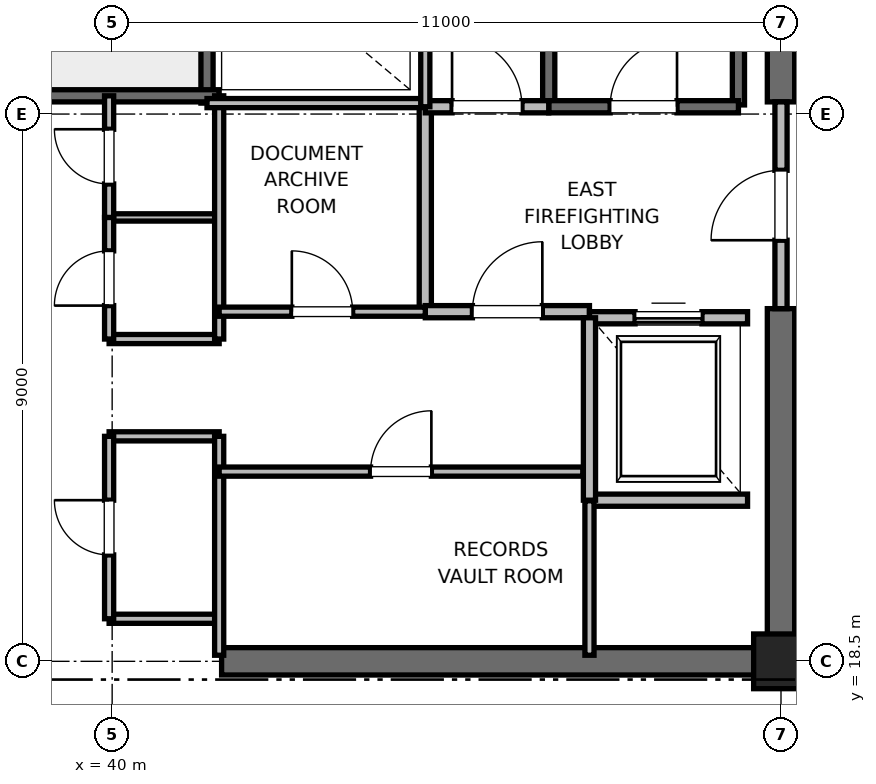
"""IFC4 building model, lengths in metres.
Left out: names, types, materials, properties, quantities, classifications, styles, units other than length and angle.
Written with IfcOpenShell. Run it as: python <this file> out.ifc"""

import sys

from ifc_helpers import new_model, si_unit, direction, frame, frame_2d, origin, origin_2d, place, context, subcontext, project, spatial, rectangle, extrude, element, fill, save


model = new_model("IFC4")
c1 = context("Model", 3, precision=1e-05, world=origin(), true_north=direction((0.0, 1.0)))
c2 = subcontext(c1, "Body", "Model", "MODEL_VIEW")
j1 = project(units=[si_unit("LENGTHUNIT", "METRE"), si_unit("PLANEANGLEUNIT", "RADIAN")], contexts=[c1])
p1 = place(None, origin())
s1 = spatial("IfcSite", under=j1, at=p1, CompositionType="ELEMENT")
p2 = place(p1, origin())
s2 = spatial("IfcBuilding", under=s1, at=p2, CompositionType="ELEMENT")
p3 = place(p2, frame((0.0, 0.0, 287.2)))
s3 = spatial("IfcBuildingStorey", under=s2, at=p3, CompositionType="ELEMENT", Elevation=287.2)
p4 = place(p3, frame((51.0, 18.5, 0.0), z_axis=(0.0, 0.0, 1.0), x_axis=(1.0, 0.0, 0.0)))
e1 = element("IfcColumn", 1, at=p4, inside=s3, PredefinedType="PILASTER", context=c2, shape_type="SweptSolid", body=[
    extrude(rectangle(XDim=0.9, YDim=0.9, at=origin_2d()), origin(), (0.0, 0.0, 1.0), 4.0),
])
p5 = place(p3, frame((41.8, 18.5, 0.0), z_axis=(0.0, 0.0, 1.0), x_axis=(1.0, 0.0, 0.0)))
e2 = element("IfcWall", 2, at=p5, inside=s3, PredefinedType="SHEAR", context=c2, shape_type="SweptSolid", body=[
    extrude(rectangle(XDim=9.2, YDim=0.45, at=frame_2d((4.6, 0.0))), origin(), (0.0, 0.0, 1.0), 3.785),
])
p6 = place(p3, frame((51.0, 18.5, 0.0), z_axis=(0.0, 0.0, 1.0), x_axis=(0.0, 1.0, 0.0)))
e3 = element("IfcWall", 3, at=p6, inside=s3, PredefinedType="SHEAR", context=c2, shape_type="SweptSolid", body=[
    extrude(rectangle(XDim=5.8, YDim=0.45, at=frame_2d((2.9, 0.0))), origin(), (0.0, 0.0, 1.0), 3.785),
])
p7 = place(p3, frame((51.0, 27.7, 0.0), z_axis=(0.0, 0.0, 1.0), x_axis=(0.0, 1.0, 0.0)))
e4 = element("IfcWall", 4, at=p7, inside=s3, PredefinedType="SHEAR", context=c2, shape_type="SweptSolid", body=[
    extrude(rectangle(XDim=8.8, YDim=0.45, at=frame_2d((4.4, 0.0))), origin(), (0.0, 0.0, 1.0), 3.785),
])
p8 = place(p3, frame((50.3, 27.65, 0.0), z_axis=(0.0, 0.0, 1.0), x_axis=(0.0, 1.0, 0.0)))
e5 = element("IfcWall", 5, at=p8, inside=s3, PredefinedType="SOLIDWALL", context=c2, shape_type="SweptSolid", body=[
    extrude(rectangle(XDim=8.15, YDim=0.2, at=frame_2d((4.075, 0.0))), origin(), (0.0, 0.0, 1.0), 3.785),
])
p9 = place(p3, frame((47.18, 27.62, 0.0), z_axis=(0.0, 0.0, 1.0), x_axis=(0.0, 1.0, 0.0)))
e6 = element("IfcWall", 6, at=p9, inside=s3, PredefinedType="SOLIDWALL", context=c2, shape_type="SweptSolid", body=[
    extrude(rectangle(XDim=8.18, YDim=0.2, at=frame_2d((4.09, 0.0))), origin(), (0.0, 0.0, 1.0), 3.785),
])
p10 = place(p3, frame((47.18, 27.62, 0.0), z_axis=(0.0, 0.0, 1.0), x_axis=(1.0, 0.0, 0.0)))
e7 = element("IfcWall", 7, at=p10, inside=s3, PredefinedType="SOLIDWALL", context=c2, shape_type="SweptSolid", body=[
    extrude(rectangle(XDim=3.12, YDim=0.2, at=frame_2d((1.56, 0.0))), origin(), (0.0, 0.0, 1.0), 3.785),
])
p11 = place(p10, frame((1.01, 0.0, 0.0)))
e8 = element("IfcOpeningElement", 8, at=p11, cuts=e7, PredefinedType="OPENING", context=c2, shape_type="SweptSolid", body=[
    extrude(rectangle(XDim=1.1, YDim=2.15, at=frame_2d((0.55, 1.075))), frame((0.0, 0.1, 0.0), z_axis=(0.0, -1.0, 0.0), x_axis=(1.0, 0.0, 0.0)), (0.0, 0.0, 1.0), 0.2),
])
p12 = place(p3, frame((41.56, 27.68, 0.0), z_axis=(0.0, 0.0, 1.0), x_axis=(0.0, 1.0, 0.0)))
e9 = element("IfcWall", 9, at=p12, inside=s3, PredefinedType="SOLIDWALL", context=c2, shape_type="SweptSolid", body=[
    extrude(rectangle(XDim=8.57, YDim=0.2, at=frame_2d((4.285, 0.0))), origin(), (0.0, 0.0, 1.0), 3.785),
])
p13 = place(p3, frame((38.44, 27.8, 0.0), z_axis=(0.0, 0.0, 1.0), x_axis=(1.0, 0.0, 0.0)))
e10 = element("IfcWall", 10, at=p13, inside=s3, PredefinedType="SOLIDWALL", context=c2, shape_type="SweptSolid", body=[
    extrude(rectangle(XDim=3.32, YDim=0.2, at=frame_2d((1.66, 0.0))), origin(), (0.0, 0.0, 1.0), 3.785),
])
p14 = place(p3, frame((45.15, 24.25, 0.0), z_axis=(0.0, 0.0, 1.0), x_axis=(0.0, 1.0, 0.0)))
e11 = element("IfcWall", 11, at=p14, inside=s3, PredefinedType="PARTITIONING", context=c2, shape_type="SweptSolid", body=[
    extrude(rectangle(XDim=3.37, YDim=0.2, at=frame_2d((1.685, 0.0))), origin(), (0.0, 0.0, 1.0), 3.785),
])
p15 = place(p3, frame((45.15, 24.25, 0.0), z_axis=(0.0, 0.0, 1.0), x_axis=(1.0, 0.0, 0.0)))
e12 = element("IfcWall", 12, at=p15, inside=s3, PredefinedType="PARTITIONING", context=c2, shape_type="SweptSolid", body=[
    extrude(rectangle(XDim=2.7, YDim=0.2, at=frame_2d((1.35, 0.0))), origin(), (0.0, 0.0, 1.0), 3.785),
])
p16 = place(p15, frame((0.775, 0.0, 0.0)))
e13 = element("IfcOpeningElement", 13, at=p16, cuts=e12, PredefinedType="OPENING", context=c2, shape_type="SweptSolid", body=[
    extrude(rectangle(XDim=1.15, YDim=2.2, at=frame_2d((0.575, 1.1))), frame((0.0, 0.1, 0.0), z_axis=(0.0, -1.0, 0.0), x_axis=(1.0, 0.0, 0.0)), (0.0, 0.0, 1.0), 0.2),
])
p17 = place(p3, frame((45.15, 27.62, 0.0), z_axis=(0.0, 0.0, 1.0), x_axis=(1.0, 0.0, 0.0)))
e14 = element("IfcWall", 14, at=p17, inside=s3, PredefinedType="PARTITIONING", context=c2, shape_type="SweptSolid", body=[
    extrude(rectangle(XDim=2.03, YDim=0.2, at=frame_2d((1.015, 0.0))), origin(), (0.0, 0.0, 1.0), 3.785),
])
p18 = place(p17, frame((0.44, 0.0, 0.0)))
e15 = element("IfcOpeningElement", 15, at=p18, cuts=e14, PredefinedType="OPENING", context=c2, shape_type="SweptSolid", body=[
    extrude(rectangle(XDim=1.15, YDim=2.2, at=frame_2d((0.575, 1.1))), frame((0.0, 0.1, 0.0), z_axis=(0.0, -1.0, 0.0), x_axis=(1.0, 0.0, 0.0)), (0.0, 0.0, 1.0), 0.2),
])
p19 = place(p3, frame((51.0, 24.3, 0.0), z_axis=(0.0, 0.0, 1.0), x_axis=(0.0, 1.0, 0.0)))
e16 = element("IfcWall", 16, at=p19, inside=s3, PredefinedType="PARTITIONING", context=c2, shape_type="SweptSolid", body=[
    extrude(rectangle(XDim=3.4, YDim=0.2, at=frame_2d((1.7, 0.0))), origin(), (0.0, 0.0, 1.0), 2.865),
])
p20 = place(p19, frame((1.125, 0.0, 0.0)))
e17 = element("IfcOpeningElement", 17, at=p20, cuts=e16, PredefinedType="OPENING", context=c2, shape_type="SweptSolid", body=[
    extrude(rectangle(XDim=1.15, YDim=2.2, at=frame_2d((0.575, 1.1))), frame((0.0, 0.1, 0.0), z_axis=(0.0, -1.0, 0.0), x_axis=(1.0, 0.0, 0.0)), (0.0, 0.0, 1.0), 0.2),
])
p21 = place(p3, frame((47.85, 21.15, 0.0), z_axis=(0.0, 0.0, 1.0), x_axis=(1.0, 0.0, 0.0)))
e18 = element("IfcWall", 18, at=p21, inside=s3, PredefinedType="SOLIDWALL", context=c2, shape_type="SweptSolid", body=[
    extrude(rectangle(XDim=2.6, YDim=0.2, at=frame_2d((1.3, 0.0))), origin(), (0.0, 0.0, 1.0), 3.785),
])
p22 = place(p3, frame((50.45, 24.15, 0.0), z_axis=(0.0, 0.0, 1.0), x_axis=(-1.0, 0.0, 0.0)))
e19 = element("IfcWall", 19, at=p22, inside=s3, PredefinedType="SOLIDWALL", context=c2, shape_type="SweptSolid", body=[
    extrude(rectangle(XDim=2.6, YDim=0.2, at=frame_2d((1.3, 0.0))), origin(), (0.0, 0.0, 1.0), 2.865),
])
p23 = place(p22, frame((0.75, 0.0, 0.0)))
e20 = element("IfcOpeningElement", 20, at=p23, cuts=e19, PredefinedType="OPENING", context=c2, shape_type="SweptSolid", body=[
    extrude(rectangle(XDim=1.1, YDim=2.2, at=frame_2d((0.55, 1.1))), frame((0.0, 0.1, 0.0), z_axis=(0.0, -1.0, 0.0), x_axis=(1.0, 0.0, 0.0)), (0.0, 0.0, 1.0), 0.2),
])
p24 = place(p3, frame((47.85, 24.15, 0.0), z_axis=(0.0, 0.0, 1.0), x_axis=(0.0, -1.0, 0.0)))
e21 = element("IfcWall", 21, at=p24, inside=s3, PredefinedType="SOLIDWALL", context=c2, shape_type="SweptSolid", body=[
    extrude(rectangle(XDim=3.0, YDim=0.2, at=frame_2d((1.5, 0.0))), origin(), (0.0, 0.0, 1.0), 3.785),
])
for number, where, z_axis, x_axis in (
    (22, (39.95, 19.2, 0.0), (0.0, 0.0, 1.0), (1.0, 0.0, 0.0)),
    (23, (39.95, 22.2, 0.0), (0.0, 0.0, 1.0), (1.0, 0.0, 0.0)),
    (24, (39.95, 23.8, 0.0), (0.0, 0.0, 1.0), (1.0, 0.0, 0.0)),
):
    element("IfcWall", number, at=place(p3, frame(where, z_axis=z_axis, x_axis=x_axis)), inside=s3, PredefinedType="PARTITIONING", context=c2, shape_type="SweptSolid", body=[
        extrude(rectangle(XDim=1.81, YDim=0.15, at=frame_2d((0.905, 0.0))), origin(), (0.0, 0.0, 1.0), 2.85),
    ])
p25 = place(p3, frame((39.95, 25.8, 0.0), z_axis=(0.0, 0.0, 1.0), x_axis=(1.0, 0.0, 0.0)))
e25 = element("IfcWall", 25, at=p25, inside=s3, PredefinedType="PARTITIONING", context=c2, shape_type="SweptSolid", body=[
    extrude(rectangle(XDim=1.81, YDim=0.12, at=frame_2d((0.905, 0.0))), origin(), (0.0, 0.0, 1.0), 2.85),
])
p26 = place(p3, frame((41.76, 18.6, 0.0), z_axis=(0.0, 0.0, 1.0), x_axis=(0.0, 1.0, 0.0)))
e26 = element("IfcWall", 26, at=p26, inside=s3, PredefinedType="PARTITIONING", context=c2, shape_type="SweptSolid", body=[
    extrude(rectangle(XDim=3.6, YDim=0.15, at=frame_2d((1.8, 0.0))), origin(), (0.0, 0.0, 1.0), 2.85),
])
p27 = place(p3, frame((41.76, 23.8, 0.0), z_axis=(0.0, 0.0, 1.0), x_axis=(0.0, 1.0, 0.0)))
e27 = element("IfcWall", 27, at=p27, inside=s3, PredefinedType="PARTITIONING", context=c2, shape_type="SweptSolid", body=[
    extrude(rectangle(XDim=4.0, YDim=0.15, at=frame_2d((2.0, 0.0))), origin(), (0.0, 0.0, 1.0), 2.85),
])
p28 = place(p3, frame((39.95, 19.2, 0.0), z_axis=(0.0, 0.0, 1.0), x_axis=(0.0, 1.0, 0.0)))
e28 = element("IfcWall", 28, at=p28, inside=s3, PredefinedType="PARTITIONING", context=c2, shape_type="SweptSolid", body=[
    extrude(rectangle(XDim=3.0, YDim=0.15, at=frame_2d((1.5, 0.0))), origin(), (0.0, 0.0, 1.0), 2.85),
])
p29 = place(p28, frame((1.05, 0.0, 0.0)))
e29 = element("IfcOpeningElement", 29, at=p29, cuts=e28, PredefinedType="OPENING", context=c2, shape_type="SweptSolid", body=[
    extrude(rectangle(XDim=0.9, YDim=2.1, at=frame_2d((0.45, 1.05))), frame((0.0, 0.075, 0.0), z_axis=(0.0, -1.0, 0.0), x_axis=(1.0, 0.0, 0.0)), (0.0, 0.0, 1.0), 0.15),
])
p30 = place(p3, frame((39.95, 23.8, 0.0), z_axis=(0.0, 0.0, 1.0), x_axis=(0.0, 1.0, 0.0)))
e30 = element("IfcWall", 30, at=p30, inside=s3, PredefinedType="PARTITIONING", context=c2, shape_type="SweptSolid", body=[
    extrude(rectangle(XDim=2.0, YDim=0.15, at=frame_2d((1.0, 0.0))), origin(), (0.0, 0.0, 1.0), 2.85),
])
p31 = place(p30, frame((0.55, 0.0, 0.0)))
e31 = element("IfcOpeningElement", 31, at=p31, cuts=e30, PredefinedType="OPENING", context=c2, shape_type="SweptSolid", body=[
    extrude(rectangle(XDim=0.9, YDim=2.1, at=frame_2d((0.45, 1.05))), frame((0.0, 0.075, 0.0), z_axis=(0.0, -1.0, 0.0), x_axis=(1.0, 0.0, 0.0)), (0.0, 0.0, 1.0), 0.15),
])
p32 = place(p3, frame((39.95, 25.8, 0.0), z_axis=(0.0, 0.0, 1.0), x_axis=(0.0, 1.0, 0.0)))
e32 = element("IfcWall", 32, at=p32, inside=s3, PredefinedType="PARTITIONING", context=c2, shape_type="SweptSolid", body=[
    extrude(rectangle(XDim=2.0, YDim=0.15, at=frame_2d((1.0, 0.0))), origin(), (0.0, 0.0, 1.0), 2.85),
])
p33 = place(p32, frame((0.55, 0.0, 0.0)))
e33 = element("IfcOpeningElement", 33, at=p33, cuts=e32, PredefinedType="OPENING", context=c2, shape_type="SweptSolid", body=[
    extrude(rectangle(XDim=0.9, YDim=2.1, at=frame_2d((0.45, 1.05))), frame((0.0, 0.075, 0.0), z_axis=(0.0, -1.0, 0.0), x_axis=(1.0, 0.0, 0.0)), (0.0, 0.0, 1.0), 0.15),
])
p34 = place(p3, frame((41.56, 27.68, 0.0), z_axis=(0.0, 0.0, 1.0), x_axis=(1.0, 0.0, 0.0)))
e34 = element("IfcWall", 34, at=p34, inside=s3, PredefinedType="PARTITIONING", context=c2, shape_type="SweptSolid", body=[
    extrude(rectangle(XDim=3.59, YDim=0.15, at=frame_2d((1.795, 0.0))), origin(), (0.0, 0.0, 1.0), 2.85),
])
p35 = place(p3, frame((47.85, 18.6, 0.0), z_axis=(0.0, 0.0, 1.0), x_axis=(0.0, 1.0, 0.0)))
e35 = element("IfcWall", 35, at=p35, inside=s3, PredefinedType="PARTITIONING", context=c2, shape_type="SweptSolid", body=[
    extrude(rectangle(XDim=2.54, YDim=0.15, at=frame_2d((1.27, 0.0))), origin(), (0.0, 0.0, 1.0), 2.85),
])
p36 = place(p3, frame((41.76, 21.62, 0.0), z_axis=(0.0, 0.0, 1.0), x_axis=(1.0, 0.0, 0.0)))
e36 = element("IfcWall", 36, at=p36, inside=s3, PredefinedType="PARTITIONING", context=c2, shape_type="SweptSolid", body=[
    extrude(rectangle(XDim=5.98, YDim=0.15, at=frame_2d((2.99, 0.0))), origin(), (0.0, 0.0, 1.0), 2.85),
])
p37 = place(p36, frame((2.49, 0.0, 0.0)))
e37 = element("IfcOpeningElement", 37, at=p37, cuts=e36, PredefinedType="OPENING", context=c2, shape_type="SweptSolid", body=[
    extrude(rectangle(XDim=1.0, YDim=2.15, at=frame_2d((0.5, 1.075))), frame((0.0, 0.075, 0.0), z_axis=(0.0, -1.0, 0.0), x_axis=(1.0, 0.0, 0.0)), (0.0, 0.0, 1.0), 0.15),
])
p38 = place(p3, frame((41.76, 24.25, 0.0), z_axis=(0.0, 0.0, 1.0), x_axis=(1.0, 0.0, 0.0)))
e38 = element("IfcWall", 38, at=p38, inside=s3, PredefinedType="PARTITIONING", context=c2, shape_type="SweptSolid", body=[
    extrude(rectangle(XDim=3.39, YDim=0.15, at=frame_2d((1.695, 0.0))), origin(), (0.0, 0.0, 1.0), 2.85),
])
p39 = place(p38, frame((1.195, 0.0, 0.0)))
e39 = element("IfcOpeningElement", 39, at=p39, cuts=e38, PredefinedType="OPENING", context=c2, shape_type="SweptSolid", body=[
    extrude(rectangle(XDim=1.0, YDim=2.15, at=frame_2d((0.5, 1.075))), frame((0.0, 0.075, 0.0), z_axis=(0.0, -1.0, 0.0), x_axis=(1.0, 0.0, 0.0)), (0.0, 0.0, 1.0), 0.15),
])
p40 = place(p3, frame((45.15, 27.62, 0.0), z_axis=(0.0, 0.0, 1.0), x_axis=(0.0, 1.0, 0.0)))
e40 = element("IfcWall", 40, at=p40, inside=s3, PredefinedType="PARTITIONING", context=c2, shape_type="SweptSolid", body=[
    extrude(rectangle(XDim=3.1, YDim=0.15, at=frame_2d((1.55, 0.0))), origin(), (0.0, 0.0, 1.0), 2.85),
])
p41 = place(p11, origin())
e41 = element("IfcDoor", 41, at=p41, inside=s3, OperationType="SINGLE_SWING_RIGHT", PredefinedType="DOOR", context=c2, shape_type="SweptSolid", body=[
    extrude(rectangle(XDim=1.1, YDim=2.15, at=frame_2d((0.55, 1.075))), frame((0.0, 0.025, 0.0), z_axis=(0.0, -1.0, 0.0), x_axis=(1.0, 0.0, 0.0)), (0.0, 0.0, 1.0), 0.05),
])
fill(e8, e41)
p42 = place(p16, origin())
e42 = element("IfcDoor", 42, at=p42, inside=s3, OperationType="SINGLE_SWING_RIGHT", PredefinedType="DOOR", context=c2, shape_type="SweptSolid", body=[
    extrude(rectangle(XDim=1.15, YDim=2.2, at=frame_2d((0.575, 1.1))), frame((0.0, 0.025, 0.0), z_axis=(0.0, -1.0, 0.0), x_axis=(1.0, 0.0, 0.0)), (0.0, 0.0, 1.0), 0.05),
])
fill(e13, e42)
p43 = place(p18, origin())
e43 = element("IfcDoor", 43, at=p43, inside=s3, OperationType="SINGLE_SWING_LEFT", PredefinedType="DOOR", context=c2, shape_type="SweptSolid", body=[
    extrude(rectangle(XDim=1.15, YDim=2.2, at=frame_2d((0.575, 1.1))), frame((0.0, 0.025, 0.0), z_axis=(0.0, -1.0, 0.0), x_axis=(1.0, 0.0, 0.0)), (0.0, 0.0, 1.0), 0.05),
])
fill(e15, e43)
p44 = place(p20, origin())
e44 = element("IfcDoor", 44, at=p44, inside=s3, OperationType="SINGLE_SWING_LEFT", PredefinedType="DOOR", context=c2, shape_type="SweptSolid", body=[
    extrude(rectangle(XDim=1.15, YDim=2.2, at=frame_2d((0.575, 1.1))), frame((0.0, 0.025, 0.0), z_axis=(0.0, -1.0, 0.0), x_axis=(1.0, 0.0, 0.0)), (0.0, 0.0, 1.0), 0.05),
])
fill(e17, e44)
p45 = place(p23, origin())
e45 = element("IfcDoor", 45, at=p45, inside=s3, OperationType="SLIDING_TO_RIGHT", PredefinedType="DOOR", context=c2, shape_type="SweptSolid", body=[
    extrude(rectangle(XDim=1.1, YDim=2.2, at=frame_2d((0.55, 1.1))), frame((0.0, 0.025, 0.0), z_axis=(0.0, -1.0, 0.0), x_axis=(1.0, 0.0, 0.0)), (0.0, 0.0, 1.0), 0.05),
])
fill(e20, e45)
p46 = place(p29, origin())
e46 = element("IfcDoor", 46, at=p46, inside=s3, OperationType="SINGLE_SWING_RIGHT", PredefinedType="DOOR", context=c2, shape_type="SweptSolid", body=[
    extrude(rectangle(XDim=0.9, YDim=2.1, at=frame_2d((0.45, 1.05))), frame((0.0, 0.025, 0.0), z_axis=(0.0, -1.0, 0.0), x_axis=(1.0, 0.0, 0.0)), (0.0, 0.0, 1.0), 0.05),
])
fill(e29, e46)
p47 = place(p31, origin())
e47 = element("IfcDoor", 47, at=p47, inside=s3, OperationType="SINGLE_SWING_LEFT", PredefinedType="DOOR", context=c2, shape_type="SweptSolid", body=[
    extrude(rectangle(XDim=0.9, YDim=2.1, at=frame_2d((0.45, 1.05))), frame((0.0, 0.025, 0.0), z_axis=(0.0, -1.0, 0.0), x_axis=(1.0, 0.0, 0.0)), (0.0, 0.0, 1.0), 0.05),
])
fill(e31, e47)
p48 = place(p33, origin())
e48 = element("IfcDoor", 48, at=p48, inside=s3, OperationType="SINGLE_SWING_RIGHT", PredefinedType="DOOR", context=c2, shape_type="SweptSolid", body=[
    extrude(rectangle(XDim=0.9, YDim=2.1, at=frame_2d((0.45, 1.05))), frame((0.0, 0.025, 0.0), z_axis=(0.0, -1.0, 0.0), x_axis=(1.0, 0.0, 0.0)), (0.0, 0.0, 1.0), 0.05),
])
fill(e33, e48)
p49 = place(p37, origin())
e49 = element("IfcDoor", 49, at=p49, inside=s3, OperationType="SINGLE_SWING_RIGHT", PredefinedType="DOOR", context=c2, shape_type="SweptSolid", body=[
    extrude(rectangle(XDim=1.0, YDim=2.15, at=frame_2d((0.5, 1.075))), frame((0.0, 0.025, 0.0), z_axis=(0.0, -1.0, 0.0), x_axis=(1.0, 0.0, 0.0)), (0.0, 0.0, 1.0), 0.05),
])
fill(e37, e49)
p50 = place(p39, origin())
e50 = element("IfcDoor", 50, at=p50, inside=s3, OperationType="SINGLE_SWING_LEFT", PredefinedType="DOOR", context=c2, shape_type="SweptSolid", body=[
    extrude(rectangle(XDim=1.0, YDim=2.15, at=frame_2d((0.5, 1.075))), frame((0.0, 0.025, 0.0), z_axis=(0.0, -1.0, 0.0), x_axis=(1.0, 0.0, 0.0)), (0.0, 0.0, 1.0), 0.05),
])
fill(e39, e50)
save(model, sys.argv[1])
